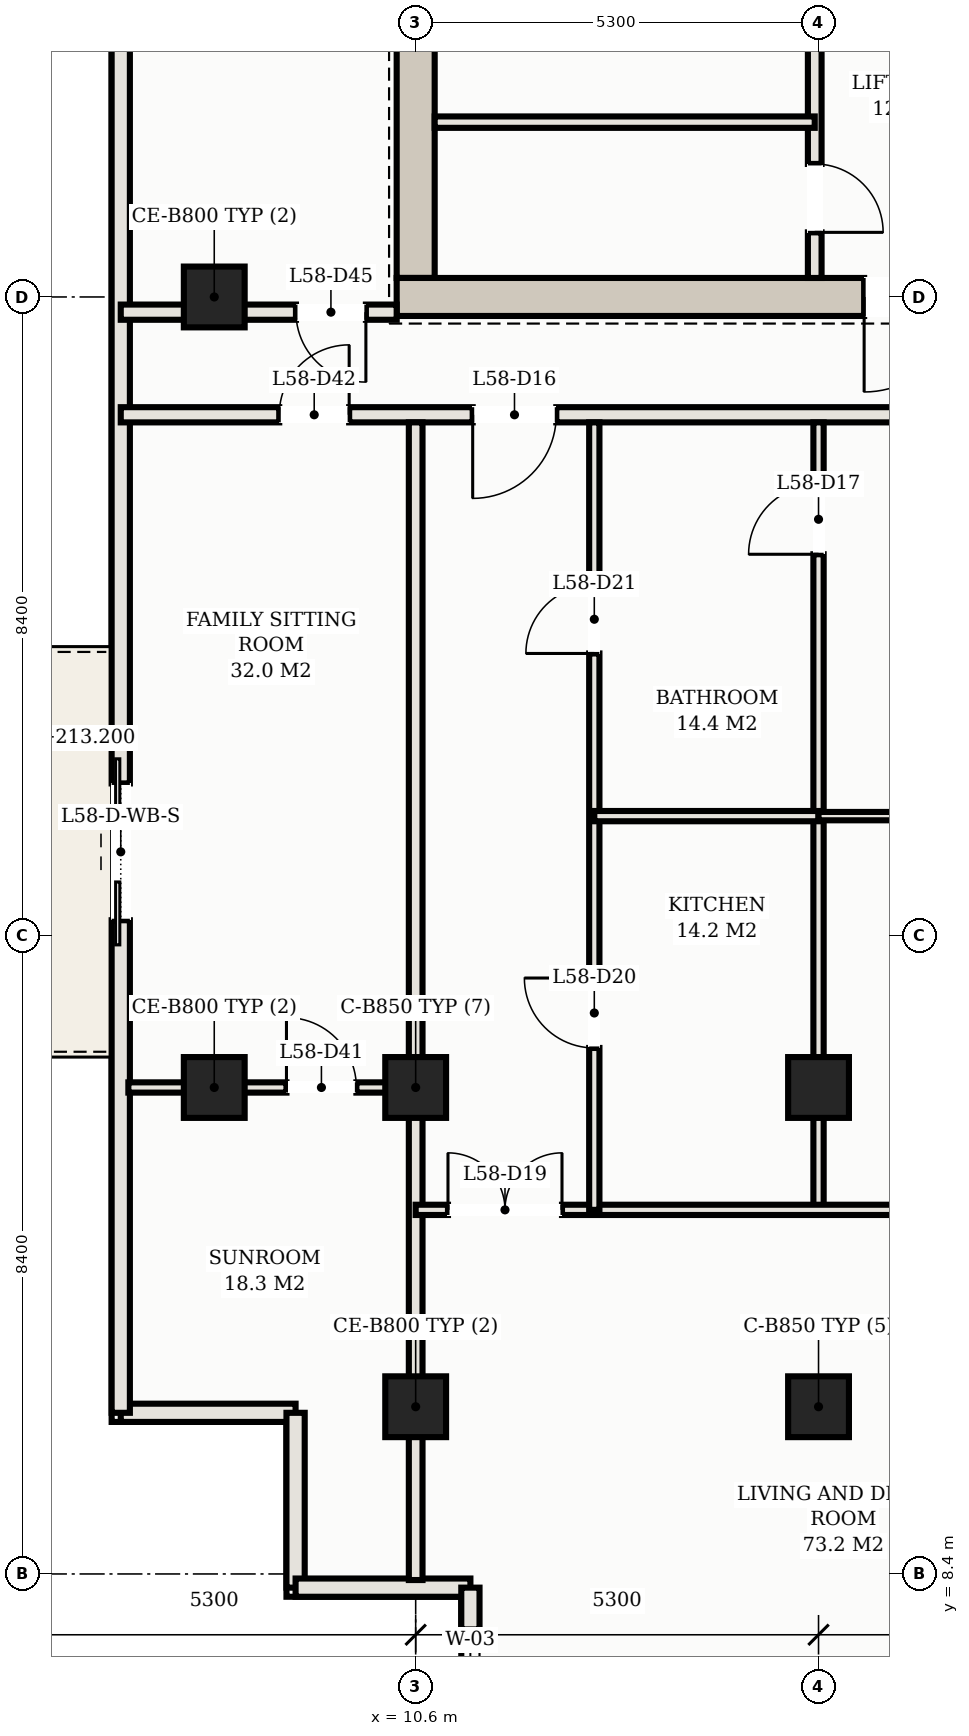
"""IFC4 building model, lengths in metres.
Left out: names, types, materials, properties, quantities, classifications, styles, units other than length and angle.
Written with IfcOpenShell. Run it as: python <this file> out.ifc"""

import sys

from ifc_helpers import new_model, si_unit, direction, frame, frame_2d, origin, origin_2d, place, context, subcontext, project, spatial, rectangle, hollow_rectangle, extrude, element, fill, save


model = new_model("IFC4")
c1 = context("Model", 3, precision=1e-05, world=origin(), true_north=direction((0.0, 1.0)))
c2 = subcontext(c1, "Body", "Model", "MODEL_VIEW")
j1 = project(units=[si_unit("LENGTHUNIT", "METRE"), si_unit("PLANEANGLEUNIT", "RADIAN")], contexts=[c1])
p1 = place(None, origin())
s1 = spatial("IfcSite", under=j1, at=p1, CompositionType="ELEMENT")
p2 = place(p1, origin())
s2 = spatial("IfcBuilding", under=s1, at=p2, CompositionType="ELEMENT")
p3 = place(p2, frame((0.0, 0.0, 213.2)))
s3 = spatial("IfcBuildingStorey", under=s2, at=p3, CompositionType="ELEMENT", Elevation=213.2)
p4 = place(p3, frame((10.6, 25.45, 0.0), z_axis=(0.0, 0.0, 1.0), x_axis=(0.0, 1.0, 0.0)))
e1 = element("IfcWall", 1, at=p4, inside=s3, PredefinedType="SHEAR", context=c2, shape_type="SweptSolid", body=[
    extrude(rectangle(XDim=14.3, YDim=0.5, at=frame_2d((7.15, 0.0))), origin(), (0.0, 0.0, 1.0), 3.11),
])
p5 = place(p3, frame((10.35, 25.2, 0.0), z_axis=(0.0, 0.0, 1.0), x_axis=(1.0, 0.0, 0.0)))
e2 = element("IfcWall", 2, at=p5, inside=s3, PredefinedType="SHEAR", context=c2, shape_type="SweptSolid", body=[
    extrude(rectangle(XDim=8.05, YDim=0.5, at=frame_2d((4.025, 0.0))), origin(), (0.0, 0.0, 1.0), 3.11),
])
p6 = place(p5, frame((6.15, 0.0, 0.0)))
e3 = element("IfcOpeningElement", 3, at=p6, cuts=e2, PredefinedType="OPENING", context=c2, shape_type="SweptSolid", body=[
    extrude(rectangle(XDim=1.25, YDim=2.2, at=frame_2d((0.625, 1.1))), frame((0.0, 0.26, 0.0), z_axis=(0.0, -1.0, 0.0), x_axis=(1.0, 0.0, 0.0)), (0.0, 0.0, 1.0), 0.52),
])
for number, where, z_axis, x_axis in (
    (4, (10.6, 14.8, 0.0), (0.0, 0.0, 1.0), (1.0, 0.0, 0.0)),
    (5, (10.6, 10.6, 0.0), (0.0, 0.0, 1.0), (1.0, 0.0, 0.0)),
    (6, (15.9, 14.8, 0.0), (0.0, 0.0, 1.0), (1.0, 0.0, 0.0)),
    (7, (15.9, 10.6, 0.0), (0.0, 0.0, 1.0), (1.0, 0.0, 0.0)),
    (8, (7.95, 14.8, 0.0), (0.0, 0.0, 1.0), (1.0, 0.0, 0.0)),
    (9, (7.95, 25.2, 0.0), (0.0, 0.0, 1.0), (1.0, 0.0, 0.0)),
):
    element("IfcColumn", number, at=place(p3, frame(where, z_axis=z_axis, x_axis=x_axis)), inside=s3, PredefinedType="COLUMN", context=c2, shape_type="SweptSolid", body=[
        extrude(hollow_rectangle(XDim=0.8, YDim=0.8, WallThickness=0.028, at=origin_2d()), origin(), (0.0, 0.0, 1.0), 3.3),
    ])
for number, where, z_axis, x_axis in (
    (10, (6.72, 10.52, 0.0), (0.0, 0.0, 1.0), (1.0, 0.0, 0.0)),
    (11, (9.02, 10.52, 0.0), (0.0, 0.0, 1.0), (0.0, -1.0, 0.0)),
    (12, (9.02, 8.22, 0.0), (0.0, 0.0, 1.0), (1.0, 0.0, 0.0)),
):
    element("IfcWall", number, at=place(p3, frame(where, z_axis=z_axis, x_axis=x_axis)), inside=s3, PredefinedType="SOLIDWALL", context=c2, shape_type="SweptSolid", body=[
        extrude(rectangle(XDim=2.3, YDim=0.24, at=frame_2d((1.15, 0.0))), origin(), (0.0, 0.0, 1.0), 3.11),
    ])
p7 = place(p3, frame((11.32, 8.22, 0.0), z_axis=(0.0, 0.0, 1.0), x_axis=(0.0, -1.0, 0.0)))
e13 = element("IfcWall", 13, at=p7, inside=s3, PredefinedType="SOLIDWALL", context=c2, shape_type="SweptSolid", body=[
    extrude(rectangle(XDim=2.3, YDim=0.24, at=frame_2d((1.15, 0.0))), origin(), (0.0, 0.0, 1.0), 3.11),
])
p8 = place(p7, frame((0.55, 0.0, 0.75)))
e14 = element("IfcOpeningElement", 14, at=p8, cuts=e13, PredefinedType="OPENING", context=c2, shape_type="SweptSolid", body=[
    extrude(rectangle(XDim=1.2, YDim=1.5, at=frame_2d((0.6, 0.75))), frame((0.0, 0.13, 0.0), z_axis=(0.0, -1.0, 0.0), x_axis=(1.0, 0.0, 0.0)), (0.0, 0.0, 1.0), 0.26),
])
p9 = place(p3, frame((6.72, 36.93, 0.0), z_axis=(0.0, 0.0, 1.0), x_axis=(0.0, -1.0, 0.0)))
e15 = element("IfcWall", 15, at=p9, inside=s3, PredefinedType="SOLIDWALL", context=c2, shape_type="SweptSolid", body=[
    extrude(rectangle(XDim=26.41, YDim=0.24, at=frame_2d((13.205, 0.0))), origin(), (0.0, 0.0, 1.0), 3.11),
])
p10 = place(p9, frame((18.13, 0.0, 0.0)))
e16 = element("IfcOpeningElement", 16, at=p10, cuts=e15, PredefinedType="OPENING", context=c2, shape_type="SweptSolid", body=[
    extrude(rectangle(XDim=1.8, YDim=2.2, at=frame_2d((0.9, 1.1))), frame((0.0, 0.13, 0.0), z_axis=(0.0, -1.0, 0.0), x_axis=(1.0, 0.0, 0.0)), (0.0, 0.0, 1.0), 0.26),
])
p11 = place(p3, frame((15.85, 25.45, 0.0), z_axis=(0.0, 0.0, 1.0), x_axis=(0.0, 1.0, 0.0)))
e17 = element("IfcWall", 17, at=p11, inside=s3, PredefinedType="PARTITIONING", context=c2, shape_type="SweptSolid", body=[
    extrude(rectangle(XDim=5.475, YDim=0.18, at=frame_2d((2.738, 0.0))), origin(), (0.0, 0.0, 1.0), 2.43),
])
p12 = place(p11, frame((0.6, 0.0, 0.0)))
e18 = element("IfcOpeningElement", 18, at=p12, cuts=e17, PredefinedType="OPENING", context=c2, shape_type="SweptSolid", body=[
    extrude(rectangle(XDim=0.9, YDim=2.15, at=frame_2d((0.45, 1.075))), frame((0.0, 0.1, 0.0), z_axis=(0.0, -1.0, 0.0), x_axis=(1.0, 0.0, 0.0)), (0.0, 0.0, 1.0), 0.2),
])
p13 = place(p11, frame((3.302, 0.0, 0.0)))
e19 = element("IfcOpeningElement", 19, at=p13, cuts=e17, PredefinedType="OPENING", context=c2, shape_type="SweptSolid", body=[
    extrude(rectangle(XDim=0.92, YDim=2.15, at=frame_2d((0.46, 1.075))), frame((0.0, 0.1, 0.0), z_axis=(0.0, -1.0, 0.0), x_axis=(1.0, 0.0, 0.0)), (0.0, 0.0, 1.0), 0.2),
])
p14 = place(p3, frame((10.85, 27.5, 0.0), z_axis=(0.0, 0.0, 1.0), x_axis=(1.0, 0.0, 0.0)))
e20 = element("IfcWall", 20, at=p14, inside=s3, PredefinedType="PARTITIONING", context=c2, shape_type="SweptSolid", body=[
    extrude(rectangle(XDim=5.0, YDim=0.15, at=frame_2d((2.5, 0.0))), origin(), (0.0, 0.0, 1.0), 2.43),
])
p15 = place(p3, frame((6.72, 23.65, 0.0), z_axis=(0.0, 0.0, 1.0), x_axis=(1.0, 0.0, 0.0)))
e21 = element("IfcWall", 21, at=p15, inside=s3, PredefinedType="PARTITIONING", context=c2, shape_type="SweptSolid", body=[
    extrude(rectangle(XDim=39.56, YDim=0.2, at=frame_2d((19.78, 0.0))), origin(), (0.0, 0.0, 1.0), 2.43),
])
p16 = place(p15, frame((4.63, 0.0, 0.0)))
e22 = element("IfcOpeningElement", 22, at=p16, cuts=e21, PredefinedType="OPENING", context=c2, shape_type="SweptSolid", body=[
    extrude(rectangle(XDim=1.1, YDim=2.25, at=frame_2d((0.55, 1.125))), frame((0.0, 0.11, 0.0), z_axis=(0.0, -1.0, 0.0), x_axis=(1.0, 0.0, 0.0)), (0.0, 0.0, 1.0), 0.22),
])
p17 = place(p15, frame((20.53, 0.0, 0.0)))
e23 = element("IfcOpeningElement", 23, at=p17, cuts=e21, PredefinedType="OPENING", context=c2, shape_type="SweptSolid", body=[
    extrude(rectangle(XDim=1.1, YDim=2.25, at=frame_2d((0.55, 1.125))), frame((0.0, 0.11, 0.0), z_axis=(0.0, -1.0, 0.0), x_axis=(1.0, 0.0, 0.0)), (0.0, 0.0, 1.0), 0.22),
])
p18 = place(p15, frame((2.085, 0.0, 0.0)))
e24 = element("IfcOpeningElement", 24, at=p18, cuts=e21, PredefinedType="OPENING", context=c2, shape_type="SweptSolid", body=[
    extrude(rectangle(XDim=0.92, YDim=2.15, at=frame_2d((0.46, 1.075))), frame((0.0, 0.11, 0.0), z_axis=(0.0, -1.0, 0.0), x_axis=(1.0, 0.0, 0.0)), (0.0, 0.0, 1.0), 0.22),
])
p19 = place(p15, frame((36.555, 0.0, 0.0)))
e25 = element("IfcOpeningElement", 25, at=p19, cuts=e21, PredefinedType="OPENING", context=c2, shape_type="SweptSolid", body=[
    extrude(rectangle(XDim=0.92, YDim=2.15, at=frame_2d((0.46, 1.075))), frame((0.0, 0.11, 0.0), z_axis=(0.0, -1.0, 0.0), x_axis=(1.0, 0.0, 0.0)), (0.0, 0.0, 1.0), 0.22),
])
p20 = place(p3, frame((6.72, 25.0, 0.0), z_axis=(0.0, 0.0, 1.0), x_axis=(1.0, 0.0, 0.0)))
e26 = element("IfcWall", 26, at=p20, inside=s3, PredefinedType="PARTITIONING", context=c2, shape_type="SweptSolid", body=[
    extrude(rectangle(XDim=3.63, YDim=0.2, at=frame_2d((1.815, 0.0))), origin(), (0.0, 0.0, 1.0), 2.43),
])
p21 = place(p20, frame((2.305, 0.0, 0.0)))
e27 = element("IfcOpeningElement", 27, at=p21, cuts=e26, PredefinedType="OPENING", context=c2, shape_type="SweptSolid", body=[
    extrude(rectangle(XDim=0.92, YDim=2.15, at=frame_2d((0.46, 1.075))), frame((0.0, 0.11, 0.0), z_axis=(0.0, -1.0, 0.0), x_axis=(1.0, 0.0, 0.0)), (0.0, 0.0, 1.0), 0.22),
])
p22 = place(p3, frame((10.6, 8.32, 0.0), z_axis=(0.0, 0.0, 1.0), x_axis=(0.0, 1.0, 0.0)))
e28 = element("IfcWall", 28, at=p22, inside=s3, PredefinedType="PARTITIONING", context=c2, shape_type="SweptSolid", body=[
    extrude(rectangle(XDim=15.23, YDim=0.18, at=frame_2d((7.615, 0.0))), origin(), (0.0, 0.0, 1.0), 2.43),
])
p23 = place(p3, frame((15.9, 14.8, 0.0), z_axis=(0.0, 0.0, 1.0), x_axis=(0.0, 1.0, 0.0)))
e29 = element("IfcWall", 29, at=p23, inside=s3, PredefinedType="PARTITIONING", context=c2, shape_type="SweptSolid", body=[
    extrude(rectangle(XDim=8.75, YDim=0.135, at=frame_2d((4.375, 0.0))), origin(), (0.0, 0.0, 1.0), 2.43),
])
p24 = place(p23, frame((7.015, 0.0, 0.0)))
e30 = element("IfcOpeningElement", 30, at=p24, cuts=e29, PredefinedType="OPENING", context=c2, shape_type="SweptSolid", body=[
    extrude(rectangle(XDim=0.92, YDim=2.15, at=frame_2d((0.46, 1.075))), frame((0.0, 0.078, 0.0), z_axis=(0.0, -1.0, 0.0), x_axis=(1.0, 0.0, 0.0)), (0.0, 0.0, 1.0), 0.155),
])
p25 = place(p3, frame((15.9, 13.19, 0.0), z_axis=(0.0, 0.0, 1.0), x_axis=(0.0, 1.0, 0.0)))
e31 = element("IfcWall", 31, at=p25, inside=s3, PredefinedType="PARTITIONING", context=c2, shape_type="SweptSolid", body=[
    extrude(rectangle(XDim=1.61, YDim=0.135, at=frame_2d((0.805, 0.0))), origin(), (0.0, 0.0, 1.0), 2.43),
])
p26 = place(p3, frame((10.6, 13.19, 0.0), z_axis=(0.0, 0.0, 1.0), x_axis=(1.0, 0.0, 0.0)))
e32 = element("IfcWall", 32, at=p26, inside=s3, PredefinedType="PARTITIONING", context=c2, shape_type="SweptSolid", body=[
    extrude(rectangle(XDim=10.6, YDim=0.135, at=frame_2d((5.3, 0.0))), origin(), (0.0, 0.0, 1.0), 2.43),
])
p27 = place(p26, frame((0.425, 0.0, 0.0)))
e33 = element("IfcOpeningElement", 33, at=p27, cuts=e32, PredefinedType="OPENING", context=c2, shape_type="SweptSolid", body=[
    extrude(rectangle(XDim=1.5, YDim=2.25, at=frame_2d((0.75, 1.125))), frame((0.0, 0.078, 0.0), z_axis=(0.0, -1.0, 0.0), x_axis=(1.0, 0.0, 0.0)), (0.0, 0.0, 1.0), 0.155),
])
p28 = place(p3, frame((12.95, 13.19, 0.0), z_axis=(0.0, 0.0, 1.0), x_axis=(0.0, 1.0, 0.0)))
e34 = element("IfcWall", 34, at=p28, inside=s3, PredefinedType="PARTITIONING", context=c2, shape_type="SweptSolid", body=[
    extrude(rectangle(XDim=10.36, YDim=0.135, at=frame_2d((5.18, 0.0))), origin(), (0.0, 0.0, 1.0), 2.43),
])
p29 = place(p28, frame((2.13, 0.0, 0.0)))
e35 = element("IfcOpeningElement", 35, at=p29, cuts=e34, PredefinedType="OPENING", context=c2, shape_type="SweptSolid", body=[
    extrude(rectangle(XDim=0.92, YDim=2.15, at=frame_2d((0.46, 1.075))), frame((0.0, 0.078, 0.0), z_axis=(0.0, -1.0, 0.0), x_axis=(1.0, 0.0, 0.0)), (0.0, 0.0, 1.0), 0.155),
])
p30 = place(p28, frame((7.32, 0.0, 0.0)))
e36 = element("IfcOpeningElement", 36, at=p30, cuts=e34, PredefinedType="OPENING", context=c2, shape_type="SweptSolid", body=[
    extrude(rectangle(XDim=0.9, YDim=2.15, at=frame_2d((0.45, 1.075))), frame((0.0, 0.078, 0.0), z_axis=(0.0, -1.0, 0.0), x_axis=(1.0, 0.0, 0.0)), (0.0, 0.0, 1.0), 0.155),
])
p31 = place(p3, frame((12.95, 18.37, 0.0), z_axis=(0.0, 0.0, 1.0), x_axis=(1.0, 0.0, 0.0)))
e37 = element("IfcWall", 37, at=p31, inside=s3, PredefinedType="PARTITIONING", context=c2, shape_type="SweptSolid", body=[
    extrude(rectangle(XDim=2.95, YDim=0.135, at=frame_2d((1.475, 0.0))), origin(), (0.0, 0.0, 1.0), 2.43),
])
p32 = place(p3, frame((15.9, 18.37, 0.0), z_axis=(0.0, 0.0, 1.0), x_axis=(1.0, 0.0, 0.0)))
e38 = element("IfcWall", 38, at=p32, inside=s3, PredefinedType="MOVABLE", context=c2, shape_type="SweptSolid", body=[
    extrude(rectangle(XDim=5.3, YDim=0.11, at=frame_2d((2.65, 0.0))), origin(), (0.0, 0.0, 1.0), 2.43),
])
p33 = place(p32, frame((1.84, 0.0, 0.0)))
e39 = element("IfcOpeningElement", 39, at=p33, cuts=e38, PredefinedType="OPENING", context=c2, shape_type="SweptSolid", body=[
    extrude(rectangle(XDim=0.92, YDim=2.15, at=frame_2d((0.46, 1.075))), frame((0.0, 0.065, 0.0), z_axis=(0.0, -1.0, 0.0), x_axis=(1.0, 0.0, 0.0)), (0.0, 0.0, 1.0), 0.13),
])
p34 = place(p3, frame((6.82, 14.8, 0.0), z_axis=(0.0, 0.0, 1.0), x_axis=(1.0, 0.0, 0.0)))
e40 = element("IfcWall", 40, at=p34, inside=s3, PredefinedType="PARTITIONING", context=c2, shape_type="SweptSolid", body=[
    extrude(rectangle(XDim=3.78, YDim=0.135, at=frame_2d((1.89, 0.0))), origin(), (0.0, 0.0, 1.0), 2.43),
])
p35 = place(p34, frame((2.08, 0.0, 0.0)))
e41 = element("IfcOpeningElement", 41, at=p35, cuts=e40, PredefinedType="OPENING", context=c2, shape_type="SweptSolid", body=[
    extrude(rectangle(XDim=0.92, YDim=2.15, at=frame_2d((0.46, 1.075))), frame((0.0, 0.078, 0.0), z_axis=(0.0, -1.0, 0.0), x_axis=(1.0, 0.0, 0.0)), (0.0, 0.0, 1.0), 0.155),
])
p36 = place(p8, origin())
e42 = element("IfcWindow", 42, at=p36, inside=s3, PartitioningType="SINGLE_PANEL", PredefinedType="WINDOW", context=c2, shape_type="SweptSolid", body=[
    extrude(rectangle(XDim=1.2, YDim=1.5, at=frame_2d((0.6, 0.75))), frame((0.0, 0.03, 0.0), z_axis=(0.0, -1.0, 0.0), x_axis=(1.0, 0.0, 0.0)), (0.0, 0.0, 1.0), 0.06),
])
fill(e14, e42)
p37 = place(p10, frame((1.8, 0.0, 0.0), z_axis=(0.0, 0.0, 1.0), x_axis=(-1.0, 0.0, 0.0)))
e43 = element("IfcDoor", 43, at=p37, inside=s3, OperationType="DOUBLE_DOOR_SLIDING", PredefinedType="DOOR", context=c2, shape_type="SweptSolid", body=[
    extrude(rectangle(XDim=1.8, YDim=2.2, at=frame_2d((0.9, 1.1))), frame((0.0, 0.025, 0.0), z_axis=(0.0, -1.0, 0.0), x_axis=(1.0, 0.0, 0.0)), (0.0, 0.0, 1.0), 0.05),
])
fill(e16, e43)
p38 = place(p6, frame((1.25, 0.0, 0.0), z_axis=(0.0, 0.0, 1.0), x_axis=(-1.0, 0.0, 0.0)))
e44 = element("IfcDoor", 44, at=p38, inside=s3, OperationType="SINGLE_SWING_RIGHT", PredefinedType="DOOR", context=c2, shape_type="SweptSolid", body=[
    extrude(rectangle(XDim=1.25, YDim=2.2, at=frame_2d((0.625, 1.1))), frame((0.0, 0.025, 0.0), z_axis=(0.0, -1.0, 0.0), x_axis=(1.0, 0.0, 0.0)), (0.0, 0.0, 1.0), 0.05),
])
fill(e3, e44)
p39 = place(p12, frame((0.9, 0.0, 0.0), z_axis=(0.0, 0.0, 1.0), x_axis=(-1.0, 0.0, 0.0)))
e45 = element("IfcDoor", 45, at=p39, inside=s3, OperationType="SINGLE_SWING_RIGHT", PredefinedType="DOOR", context=c2, shape_type="SweptSolid", body=[
    extrude(rectangle(XDim=0.9, YDim=2.15, at=frame_2d((0.45, 1.075))), frame((0.0, 0.025, 0.0), z_axis=(0.0, -1.0, 0.0), x_axis=(1.0, 0.0, 0.0)), (0.0, 0.0, 1.0), 0.05),
])
fill(e18, e45)
p40 = place(p16, frame((1.1, 0.0, 0.0), z_axis=(0.0, 0.0, 1.0), x_axis=(-1.0, 0.0, 0.0)))
e46 = element("IfcDoor", 46, at=p40, inside=s3, OperationType="SINGLE_SWING_RIGHT", PredefinedType="DOOR", context=c2, shape_type="SweptSolid", body=[
    extrude(rectangle(XDim=1.1, YDim=2.25, at=frame_2d((0.55, 1.125))), frame((0.0, 0.025, 0.0), z_axis=(0.0, -1.0, 0.0), x_axis=(1.0, 0.0, 0.0)), (0.0, 0.0, 1.0), 0.05),
])
fill(e22, e46)
p41 = place(p24, origin())
e47 = element("IfcDoor", 47, at=p41, inside=s3, OperationType="SINGLE_SWING_LEFT", PredefinedType="DOOR", context=c2, shape_type="SweptSolid", body=[
    extrude(rectangle(XDim=0.92, YDim=2.15, at=frame_2d((0.46, 1.075))), frame((0.0, 0.025, 0.0), z_axis=(0.0, -1.0, 0.0), x_axis=(1.0, 0.0, 0.0)), (0.0, 0.0, 1.0), 0.05),
])
fill(e30, e47)
p42 = place(p27, origin())
e48 = element("IfcDoor", 48, at=p42, inside=s3, OperationType="DOUBLE_DOOR_SINGLE_SWING", PredefinedType="DOOR", context=c2, shape_type="SweptSolid", body=[
    extrude(rectangle(XDim=1.5, YDim=2.25, at=frame_2d((0.75, 1.125))), frame((0.0, 0.025, 0.0), z_axis=(0.0, -1.0, 0.0), x_axis=(1.0, 0.0, 0.0)), (0.0, 0.0, 1.0), 0.05),
])
fill(e33, e48)
p43 = place(p29, origin())
e49 = element("IfcDoor", 49, at=p43, inside=s3, OperationType="SINGLE_SWING_RIGHT", PredefinedType="DOOR", context=c2, shape_type="SweptSolid", body=[
    extrude(rectangle(XDim=0.92, YDim=2.15, at=frame_2d((0.46, 1.075))), frame((0.0, 0.025, 0.0), z_axis=(0.0, -1.0, 0.0), x_axis=(1.0, 0.0, 0.0)), (0.0, 0.0, 1.0), 0.05),
])
fill(e35, e49)
p44 = place(p30, origin())
e50 = element("IfcDoor", 50, at=p44, inside=s3, OperationType="SINGLE_SWING_LEFT", PredefinedType="DOOR", context=c2, shape_type="SweptSolid", body=[
    extrude(rectangle(XDim=0.9, YDim=2.15, at=frame_2d((0.45, 1.075))), frame((0.0, 0.025, 0.0), z_axis=(0.0, -1.0, 0.0), x_axis=(1.0, 0.0, 0.0)), (0.0, 0.0, 1.0), 0.05),
])
fill(e36, e50)
p45 = place(p35, origin())
e51 = element("IfcDoor", 51, at=p45, inside=s3, OperationType="SINGLE_SWING_LEFT", PredefinedType="DOOR", context=c2, shape_type="SweptSolid", body=[
    extrude(rectangle(XDim=0.92, YDim=2.15, at=frame_2d((0.46, 1.075))), frame((0.0, 0.025, 0.0), z_axis=(0.0, -1.0, 0.0), x_axis=(1.0, 0.0, 0.0)), (0.0, 0.0, 1.0), 0.05),
])
fill(e41, e51)
p46 = place(p18, origin())
e52 = element("IfcDoor", 52, at=p46, inside=s3, OperationType="SINGLE_SWING_RIGHT", PredefinedType="DOOR", context=c2, shape_type="SweptSolid", body=[
    extrude(rectangle(XDim=0.92, YDim=2.15, at=frame_2d((0.46, 1.075))), frame((0.0, 0.025, 0.0), z_axis=(0.0, -1.0, 0.0), x_axis=(1.0, 0.0, 0.0)), (0.0, 0.0, 1.0), 0.05),
])
fill(e24, e52)
p47 = place(p21, frame((0.92, 0.0, 0.0), z_axis=(0.0, 0.0, 1.0), x_axis=(-1.0, 0.0, 0.0)))
e53 = element("IfcDoor", 53, at=p47, inside=s3, OperationType="SINGLE_SWING_LEFT", PredefinedType="DOOR", context=c2, shape_type="SweptSolid", body=[
    extrude(rectangle(XDim=0.92, YDim=2.15, at=frame_2d((0.46, 1.075))), frame((0.0, 0.025, 0.0), z_axis=(0.0, -1.0, 0.0), x_axis=(1.0, 0.0, 0.0)), (0.0, 0.0, 1.0), 0.05),
])
fill(e27, e53)
save(model, sys.argv[1])
